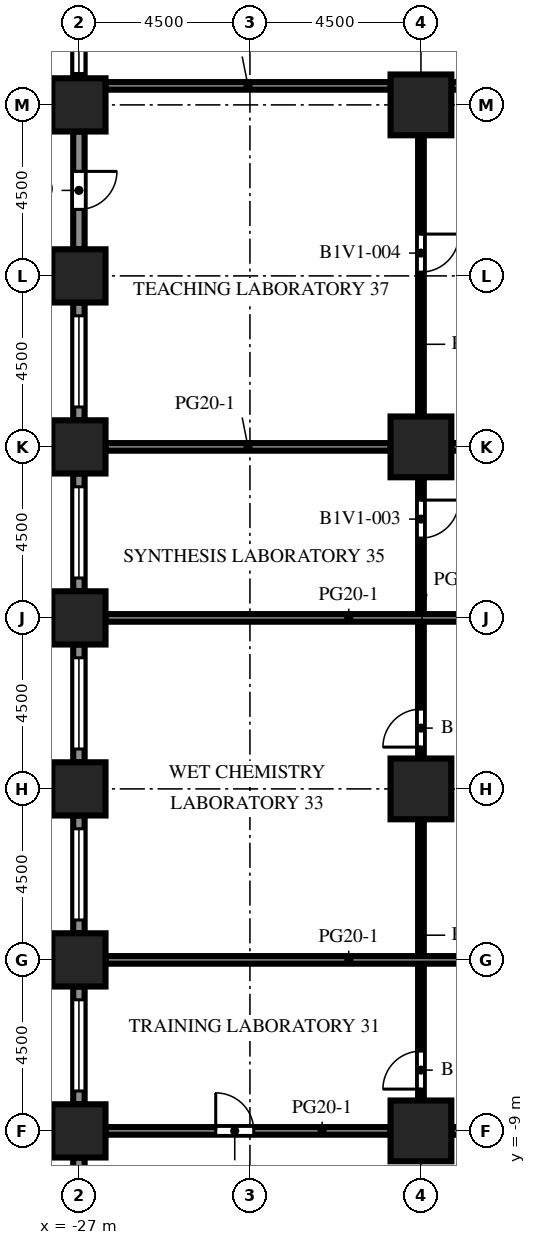
"""IFC4 building model, lengths in metres.
Left out: names, types, materials, properties, quantities, classifications, styles, units other than length and angle.
Written with IfcOpenShell. Run it as: python <this file> out.ifc"""

import sys

from ifc_helpers import new_model, si_unit, direction, frame, frame_2d, origin, origin_2d, place, context, subcontext, project, spatial, rectangle, extrude, element, fill, save


model = new_model("IFC4")
c1 = context("Model", 3, precision=1e-05, world=origin(), true_north=direction((0.0, 1.0)))
c2 = subcontext(c1, "Body", "Model", "MODEL_VIEW")
j1 = project(units=[si_unit("LENGTHUNIT", "METRE"), si_unit("PLANEANGLEUNIT", "RADIAN")], contexts=[c1])
p1 = place(None, origin())
s1 = spatial("IfcSite", under=j1, at=p1, CompositionType="ELEMENT")
p2 = place(p1, origin())
s2 = spatial("IfcBuilding", under=s1, at=p2, CompositionType="ELEMENT")
p3 = place(p2, frame((0.0, 0.0, 27.7)))
s3 = spatial("IfcBuildingStorey", under=s2, at=p3, CompositionType="ELEMENT", Elevation=27.7)
for number, where, z_axis, x_axis in (
    (1, (-27.0, -9.0, 0.0), (0.0, 0.0, 1.0), (1.0, 0.0, 0.0)),
    (2, (-27.0, -4.5, 0.0), (0.0, 0.0, 1.0), (1.0, 0.0, 0.0)),
    (3, (-27.0, 0.0, 0.0), (0.0, 0.0, 1.0), (1.0, 0.0, 0.0)),
    (4, (-27.0, 4.5, 0.0), (0.0, 0.0, 1.0), (1.0, 0.0, 0.0)),
    (5, (-27.0, 9.0, 0.0), (0.0, 0.0, 1.0), (1.0, 0.0, 0.0)),
    (6, (-27.0, 13.5, 0.0), (0.0, 0.0, 1.0), (1.0, 0.0, 0.0)),
    (7, (-27.0, 18.0, 0.0), (0.0, 0.0, 1.0), (1.0, 0.0, 0.0)),
):
    element("IfcColumn", number, at=place(p3, frame(where, z_axis=z_axis, x_axis=x_axis)), inside=s3, PredefinedType="COLUMN", context=c2, shape_type="SweptSolid", body=[
        extrude(rectangle(XDim=1.4, YDim=1.4, at=origin_2d()), origin(), (0.0, 0.0, 1.0), 4.1),
    ])
for number, where, z_axis, x_axis in (
    (8, (-18.0, -9.0, 0.0), (0.0, 0.0, 1.0), (1.0, 0.0, 0.0)),
    (9, (-18.0, 0.0, 0.0), (0.0, 0.0, 1.0), (1.0, 0.0, 0.0)),
    (10, (-18.0, 9.0, 0.0), (0.0, 0.0, 1.0), (1.0, 0.0, 0.0)),
    (11, (-18.0, 18.0, 0.0), (0.0, 0.0, 1.0), (1.0, 0.0, 0.0)),
):
    element("IfcColumn", number, at=place(p3, frame(where, z_axis=z_axis, x_axis=x_axis)), inside=s3, PredefinedType="COLUMN", context=c2, shape_type="SweptSolid", body=[
        extrude(rectangle(XDim=1.6, YDim=1.6, at=origin_2d()), origin(), (0.0, 0.0, 1.0), 4.1),
    ])
p4 = place(p3, frame((-27.0, 18.7, 0.0), z_axis=(0.0, 0.0, 1.0), x_axis=(0.0, 1.0, 0.0)))
e12 = element("IfcWall", 12, at=p4, inside=s3, PredefinedType="SOLIDWALL", context=c2, shape_type="SweptSolid", body=[
    extrude(rectangle(XDim=3.1, YDim=0.3, at=frame_2d((1.55, 0.0))), origin(), (0.0, 0.0, 1.0), 2.75),
])
p5 = place(p4, frame((0.125, 0.0, 0.8)))
e13 = element("IfcOpeningElement", 13, at=p5, cuts=e12, PredefinedType="OPENING", context=c2, shape_type="SweptSolid", body=[
    extrude(rectangle(XDim=2.4, YDim=1.7, at=frame_2d((1.2, 0.85))), frame((0.0, 0.16, 0.0), z_axis=(0.0, -1.0, 0.0), x_axis=(1.0, 0.0, 0.0)), (0.0, 0.0, 1.0), 0.32),
])
p6 = place(p3, frame((-27.0, 14.2, 0.0), z_axis=(0.0, 0.0, 1.0), x_axis=(0.0, 1.0, 0.0)))
e14 = element("IfcWall", 14, at=p6, inside=s3, PredefinedType="SOLIDWALL", context=c2, shape_type="SweptSolid", body=[
    extrude(rectangle(XDim=3.1, YDim=0.3, at=frame_2d((1.55, 0.0))), origin(), (0.0, 0.0, 1.0), 2.75),
])
p7 = place(p6, frame((1.05, 0.0, 0.0)))
e15 = element("IfcOpeningElement", 15, at=p7, cuts=e14, PredefinedType="OPENING", context=c2, shape_type="SweptSolid", body=[
    extrude(rectangle(XDim=1.0, YDim=2.2, at=frame_2d((0.5, 1.1))), frame((0.0, 0.16, 0.0), z_axis=(0.0, -1.0, 0.0), x_axis=(1.0, 0.0, 0.0)), (0.0, 0.0, 1.0), 0.32),
])
p8 = place(p3, frame((-27.0, 9.7, 0.0), z_axis=(0.0, 0.0, 1.0), x_axis=(0.0, 1.0, 0.0)))
e16 = element("IfcWall", 16, at=p8, inside=s3, PredefinedType="SOLIDWALL", context=c2, shape_type="SweptSolid", body=[
    extrude(rectangle(XDim=3.1, YDim=0.3, at=frame_2d((1.55, 0.0))), origin(), (0.0, 0.0, 1.0), 2.75),
])
p9 = place(p8, frame((0.35, 0.0, 0.8)))
e17 = element("IfcOpeningElement", 17, at=p9, cuts=e16, PredefinedType="OPENING", context=c2, shape_type="SweptSolid", body=[
    extrude(rectangle(XDim=2.4, YDim=1.7, at=frame_2d((1.2, 0.85))), frame((0.0, 0.16, 0.0), z_axis=(0.0, -1.0, 0.0), x_axis=(1.0, 0.0, 0.0)), (0.0, 0.0, 1.0), 0.32),
])
p10 = place(p3, frame((-27.0, 5.2, 0.0), z_axis=(0.0, 0.0, 1.0), x_axis=(0.0, 1.0, 0.0)))
e18 = element("IfcWall", 18, at=p10, inside=s3, PredefinedType="SOLIDWALL", context=c2, shape_type="SweptSolid", body=[
    extrude(rectangle(XDim=3.1, YDim=0.3, at=frame_2d((1.55, 0.0))), origin(), (0.0, 0.0, 1.0), 2.75),
])
p11 = place(p10, frame((0.35, 0.0, 0.8)))
e19 = element("IfcOpeningElement", 19, at=p11, cuts=e18, PredefinedType="OPENING", context=c2, shape_type="SweptSolid", body=[
    extrude(rectangle(XDim=2.4, YDim=1.7, at=frame_2d((1.2, 0.85))), frame((0.0, 0.16, 0.0), z_axis=(0.0, -1.0, 0.0), x_axis=(1.0, 0.0, 0.0)), (0.0, 0.0, 1.0), 0.32),
])
p12 = place(p3, frame((-27.0, 0.7, 0.0), z_axis=(0.0, 0.0, 1.0), x_axis=(0.0, 1.0, 0.0)))
e20 = element("IfcWall", 20, at=p12, inside=s3, PredefinedType="SOLIDWALL", context=c2, shape_type="SweptSolid", body=[
    extrude(rectangle(XDim=3.1, YDim=0.3, at=frame_2d((1.55, 0.0))), origin(), (0.0, 0.0, 1.0), 2.75),
])
p13 = place(p12, frame((0.35, 0.0, 0.8)))
e21 = element("IfcOpeningElement", 21, at=p13, cuts=e20, PredefinedType="OPENING", context=c2, shape_type="SweptSolid", body=[
    extrude(rectangle(XDim=2.4, YDim=1.7, at=frame_2d((1.2, 0.85))), frame((0.0, 0.16, 0.0), z_axis=(0.0, -1.0, 0.0), x_axis=(1.0, 0.0, 0.0)), (0.0, 0.0, 1.0), 0.32),
])
p14 = place(p3, frame((-27.0, -3.8, 0.0), z_axis=(0.0, 0.0, 1.0), x_axis=(0.0, 1.0, 0.0)))
e22 = element("IfcWall", 22, at=p14, inside=s3, PredefinedType="SOLIDWALL", context=c2, shape_type="SweptSolid", body=[
    extrude(rectangle(XDim=3.1, YDim=0.3, at=frame_2d((1.55, 0.0))), origin(), (0.0, 0.0, 1.0), 2.75),
])
p15 = place(p14, frame((0.35, 0.0, 0.8)))
e23 = element("IfcOpeningElement", 23, at=p15, cuts=e22, PredefinedType="OPENING", context=c2, shape_type="SweptSolid", body=[
    extrude(rectangle(XDim=2.4, YDim=1.7, at=frame_2d((1.2, 0.85))), frame((0.0, 0.16, 0.0), z_axis=(0.0, -1.0, 0.0), x_axis=(1.0, 0.0, 0.0)), (0.0, 0.0, 1.0), 0.32),
])
p16 = place(p3, frame((-27.0, -8.3, 0.0), z_axis=(0.0, 0.0, 1.0), x_axis=(0.0, 1.0, 0.0)))
e24 = element("IfcWall", 24, at=p16, inside=s3, PredefinedType="SOLIDWALL", context=c2, shape_type="SweptSolid", body=[
    extrude(rectangle(XDim=3.1, YDim=0.3, at=frame_2d((1.55, 0.0))), origin(), (0.0, 0.0, 1.0), 2.75),
])
p17 = place(p16, frame((0.35, 0.0, 0.8)))
e25 = element("IfcOpeningElement", 25, at=p17, cuts=e24, PredefinedType="OPENING", context=c2, shape_type="SweptSolid", body=[
    extrude(rectangle(XDim=2.4, YDim=1.7, at=frame_2d((1.2, 0.85))), frame((0.0, 0.16, 0.0), z_axis=(0.0, -1.0, 0.0), x_axis=(1.0, 0.0, 0.0)), (0.0, 0.0, 1.0), 0.32),
])
p18 = place(p3, frame((-27.0, -12.8, 0.0), z_axis=(0.0, 0.0, 1.0), x_axis=(0.0, 1.0, 0.0)))
e26 = element("IfcWall", 26, at=p18, inside=s3, PredefinedType="SOLIDWALL", context=c2, shape_type="SweptSolid", body=[
    extrude(rectangle(XDim=3.1, YDim=0.3, at=frame_2d((1.55, 0.0))), origin(), (0.0, 0.0, 1.0), 2.75),
])
p19 = place(p18, frame((1.425, 0.0, 0.8)))
e27 = element("IfcOpeningElement", 27, at=p19, cuts=e26, PredefinedType="OPENING", context=c2, shape_type="SweptSolid", body=[
    extrude(rectangle(XDim=1.2, YDim=1.7, at=frame_2d((0.6, 0.85))), frame((0.0, 0.16, 0.0), z_axis=(0.0, -1.0, 0.0), x_axis=(1.0, 0.0, 0.0)), (0.0, 0.0, 1.0), 0.32),
])
p20 = place(p3, frame((-18.0, -0.8, 0.0), z_axis=(0.0, 0.0, 1.0), x_axis=(0.0, -1.0, 0.0)))
e28 = element("IfcWall", 28, at=p20, inside=s3, PredefinedType="PARTITIONING", context=c2, shape_type="SweptSolid", body=[
    extrude(rectangle(XDim=7.4, YDim=0.15, at=frame_2d((3.7, 0.0))), origin(), (0.0, 0.0, 1.0), 3.65),
])
p21 = place(p20, frame((6.1, 0.0, 0.0)))
e29 = element("IfcOpeningElement", 29, at=p21, cuts=e28, PredefinedType="OPENING", context=c2, shape_type="SweptSolid", body=[
    extrude(rectangle(XDim=1.0, YDim=2.1, at=frame_2d((0.5, 1.05))), frame((0.0, 0.085, 0.0), z_axis=(0.0, -1.0, 0.0), x_axis=(1.0, 0.0, 0.0)), (0.0, 0.0, 1.0), 0.17),
])
p22 = place(p3, frame((-18.0, 0.8, 0.0), z_axis=(0.0, 0.0, 1.0), x_axis=(0.0, 1.0, 0.0)))
e30 = element("IfcWall", 30, at=p22, inside=s3, PredefinedType="PARTITIONING", context=c2, shape_type="SweptSolid", body=[
    extrude(rectangle(XDim=7.4, YDim=0.15, at=frame_2d((3.7, 0.0))), origin(), (0.0, 0.0, 1.0), 3.65),
])
p23 = place(p22, frame((0.3, 0.0, 0.0)))
e31 = element("IfcOpeningElement", 31, at=p23, cuts=e30, PredefinedType="OPENING", context=c2, shape_type="SweptSolid", body=[
    extrude(rectangle(XDim=1.0, YDim=2.1, at=frame_2d((0.5, 1.05))), frame((0.0, 0.085, 0.0), z_axis=(0.0, -1.0, 0.0), x_axis=(1.0, 0.0, 0.0)), (0.0, 0.0, 1.0), 0.17),
])
p24 = place(p22, frame((5.8, 0.0, 0.0)))
e32 = element("IfcOpeningElement", 32, at=p24, cuts=e30, PredefinedType="OPENING", context=c2, shape_type="SweptSolid", body=[
    extrude(rectangle(XDim=1.0, YDim=2.1, at=frame_2d((0.5, 1.05))), frame((0.0, 0.085, 0.0), z_axis=(0.0, -1.0, 0.0), x_axis=(1.0, 0.0, 0.0)), (0.0, 0.0, 1.0), 0.17),
])
p25 = place(p3, frame((-18.0, 9.8, 0.0), z_axis=(0.0, 0.0, 1.0), x_axis=(0.0, 1.0, 0.0)))
e33 = element("IfcWall", 33, at=p25, inside=s3, PredefinedType="PARTITIONING", context=c2, shape_type="SweptSolid", body=[
    extrude(rectangle(XDim=7.4, YDim=0.15, at=frame_2d((3.7, 0.0))), origin(), (0.0, 0.0, 1.0), 3.65),
])
p26 = place(p25, frame((3.8, 0.0, 0.0)))
e34 = element("IfcOpeningElement", 34, at=p26, cuts=e33, PredefinedType="OPENING", context=c2, shape_type="SweptSolid", body=[
    extrude(rectangle(XDim=1.0, YDim=2.1, at=frame_2d((0.5, 1.05))), frame((0.0, 0.085, 0.0), z_axis=(0.0, -1.0, 0.0), x_axis=(1.0, 0.0, 0.0)), (0.0, 0.0, 1.0), 0.17),
])
p27 = place(p3, frame((-26.3, -9.0, 0.0), z_axis=(0.0, 0.0, 1.0), x_axis=(1.0, 0.0, 0.0)))
e35 = element("IfcWall", 35, at=p27, inside=s3, PredefinedType="PARTITIONING", context=c2, shape_type="SweptSolid", body=[
    extrude(rectangle(XDim=7.5, YDim=0.2, at=frame_2d((3.75, 0.0))), origin(), (0.0, 0.0, 1.0), 3.65),
])
p28 = place(p27, frame((2.9, 0.0, 0.0)))
e36 = element("IfcOpeningElement", 36, at=p28, cuts=e35, PredefinedType="OPENING", context=c2, shape_type="SweptSolid", body=[
    extrude(rectangle(XDim=1.0, YDim=2.1, at=frame_2d((0.5, 1.05))), frame((0.0, 0.11, 0.0), z_axis=(0.0, -1.0, 0.0), x_axis=(1.0, 0.0, 0.0)), (0.0, 0.0, 1.0), 0.22),
])
p29 = place(p3, frame((-17.2, -9.0, 0.0), z_axis=(0.0, 0.0, 1.0), x_axis=(1.0, 0.0, 0.0)))
e37 = element("IfcWall", 37, at=p29, inside=s3, PredefinedType="PARTITIONING", context=c2, shape_type="SweptSolid", body=[
    extrude(rectangle(XDim=3.7, YDim=0.2, at=frame_2d((1.85, 0.0))), origin(), (0.0, 0.0, 1.0), 3.65),
])
for number, where, z_axis, x_axis in (
    (38, (-26.3, -4.5, 0.0), (0.0, 0.0, 1.0), (1.0, 0.0, 0.0)),
    (39, (-26.3, 4.5, 0.0), (0.0, 0.0, 1.0), (1.0, 0.0, 0.0)),
):
    element("IfcWall", number, at=place(p3, frame(where, z_axis=z_axis, x_axis=x_axis)), inside=s3, PredefinedType="PARTITIONING", context=c2, shape_type="SweptSolid", body=[
        extrude(rectangle(XDim=12.8, YDim=0.2, at=frame_2d((6.4, 0.0))), origin(), (0.0, 0.0, 1.0), 3.65),
    ])
p30 = place(p3, frame((-26.3, 9.0, 0.0), z_axis=(0.0, 0.0, 1.0), x_axis=(1.0, 0.0, 0.0)))
e40 = element("IfcWall", 40, at=p30, inside=s3, PredefinedType="PARTITIONING", context=c2, shape_type="SweptSolid", body=[
    extrude(rectangle(XDim=7.5, YDim=0.2, at=frame_2d((3.75, 0.0))), origin(), (0.0, 0.0, 1.0), 3.65),
])
p31 = place(p3, frame((-17.2, 9.0, 0.0), z_axis=(0.0, 0.0, 1.0), x_axis=(1.0, 0.0, 0.0)))
e41 = element("IfcWall", 41, at=p31, inside=s3, PredefinedType="PARTITIONING", context=c2, shape_type="SweptSolid", body=[
    extrude(rectangle(XDim=3.7, YDim=0.2, at=frame_2d((1.85, 0.0))), origin(), (0.0, 0.0, 1.0), 3.65),
])
p32 = place(p3, frame((-26.3, 18.5, 0.0), z_axis=(0.0, 0.0, 1.0), x_axis=(1.0, 0.0, 0.0)))
e42 = element("IfcWall", 42, at=p32, inside=s3, PredefinedType="PARTITIONING", context=c2, shape_type="SweptSolid", body=[
    extrude(rectangle(XDim=7.5, YDim=0.2, at=frame_2d((3.75, 0.0))), origin(), (0.0, 0.0, 1.0), 3.65),
])
p33 = place(p3, frame((-17.2, 18.5, 0.0), z_axis=(0.0, 0.0, 1.0), x_axis=(1.0, 0.0, 0.0)))
e43 = element("IfcWall", 43, at=p33, inside=s3, PredefinedType="PARTITIONING", context=c2, shape_type="SweptSolid", body=[
    extrude(rectangle(XDim=3.7, YDim=0.2, at=frame_2d((1.85, 0.0))), origin(), (0.0, 0.0, 1.0), 3.65),
])
p34 = place(p5, origin())
e44 = element("IfcWindow", 44, at=p34, inside=s3, PartitioningType="SINGLE_PANEL", PredefinedType="WINDOW", context=c2, shape_type="SweptSolid", body=[
    extrude(rectangle(XDim=2.4, YDim=1.7, at=frame_2d((1.2, 0.85))), frame((0.0, 0.03, 0.0), z_axis=(0.0, -1.0, 0.0), x_axis=(1.0, 0.0, 0.0)), (0.0, 0.0, 1.0), 0.06),
])
fill(e13, e44)
p35 = place(p7, origin())
e45 = element("IfcDoor", 45, at=p35, inside=s3, OperationType="SINGLE_SWING_RIGHT", PredefinedType="DOOR", context=c2, shape_type="SweptSolid", body=[
    extrude(rectangle(XDim=1.0, YDim=2.2, at=frame_2d((0.5, 1.1))), frame((0.0, 0.025, 0.0), z_axis=(0.0, -1.0, 0.0), x_axis=(1.0, 0.0, 0.0)), (0.0, 0.0, 1.0), 0.05),
])
fill(e15, e45)
p36 = place(p9, origin())
e46 = element("IfcWindow", 46, at=p36, inside=s3, PartitioningType="SINGLE_PANEL", PredefinedType="WINDOW", context=c2, shape_type="SweptSolid", body=[
    extrude(rectangle(XDim=2.4, YDim=1.7, at=frame_2d((1.2, 0.85))), frame((0.0, 0.03, 0.0), z_axis=(0.0, -1.0, 0.0), x_axis=(1.0, 0.0, 0.0)), (0.0, 0.0, 1.0), 0.06),
])
fill(e17, e46)
p37 = place(p11, origin())
e47 = element("IfcWindow", 47, at=p37, inside=s3, PartitioningType="SINGLE_PANEL", PredefinedType="WINDOW", context=c2, shape_type="SweptSolid", body=[
    extrude(rectangle(XDim=2.4, YDim=1.7, at=frame_2d((1.2, 0.85))), frame((0.0, 0.03, 0.0), z_axis=(0.0, -1.0, 0.0), x_axis=(1.0, 0.0, 0.0)), (0.0, 0.0, 1.0), 0.06),
])
fill(e19, e47)
p38 = place(p13, origin())
e48 = element("IfcWindow", 48, at=p38, inside=s3, PartitioningType="SINGLE_PANEL", PredefinedType="WINDOW", context=c2, shape_type="SweptSolid", body=[
    extrude(rectangle(XDim=2.4, YDim=1.7, at=frame_2d((1.2, 0.85))), frame((0.0, 0.03, 0.0), z_axis=(0.0, -1.0, 0.0), x_axis=(1.0, 0.0, 0.0)), (0.0, 0.0, 1.0), 0.06),
])
fill(e21, e48)
p39 = place(p15, origin())
e49 = element("IfcWindow", 49, at=p39, inside=s3, PartitioningType="SINGLE_PANEL", PredefinedType="WINDOW", context=c2, shape_type="SweptSolid", body=[
    extrude(rectangle(XDim=2.4, YDim=1.7, at=frame_2d((1.2, 0.85))), frame((0.0, 0.03, 0.0), z_axis=(0.0, -1.0, 0.0), x_axis=(1.0, 0.0, 0.0)), (0.0, 0.0, 1.0), 0.06),
])
fill(e23, e49)
p40 = place(p17, origin())
e50 = element("IfcWindow", 50, at=p40, inside=s3, PartitioningType="SINGLE_PANEL", PredefinedType="WINDOW", context=c2, shape_type="SweptSolid", body=[
    extrude(rectangle(XDim=2.4, YDim=1.7, at=frame_2d((1.2, 0.85))), frame((0.0, 0.03, 0.0), z_axis=(0.0, -1.0, 0.0), x_axis=(1.0, 0.0, 0.0)), (0.0, 0.0, 1.0), 0.06),
])
fill(e25, e50)
p41 = place(p21, origin())
e51 = element("IfcDoor", 51, at=p41, inside=s3, OperationType="SINGLE_SWING_RIGHT", PredefinedType="DOOR", context=c2, shape_type="SweptSolid", body=[
    extrude(rectangle(XDim=1.0, YDim=2.1, at=frame_2d((0.5, 1.05))), frame((0.0, 0.025, 0.0), z_axis=(0.0, -1.0, 0.0), x_axis=(1.0, 0.0, 0.0)), (0.0, 0.0, 1.0), 0.05),
])
fill(e29, e51)
p42 = place(p23, origin())
e52 = element("IfcDoor", 52, at=p42, inside=s3, OperationType="SINGLE_SWING_LEFT", PredefinedType="DOOR", context=c2, shape_type="SweptSolid", body=[
    extrude(rectangle(XDim=1.0, YDim=2.1, at=frame_2d((0.5, 1.05))), frame((0.0, 0.025, 0.0), z_axis=(0.0, -1.0, 0.0), x_axis=(1.0, 0.0, 0.0)), (0.0, 0.0, 1.0), 0.05),
])
fill(e31, e52)
p43 = place(p24, origin())
e53 = element("IfcDoor", 53, at=p43, inside=s3, OperationType="SINGLE_SWING_RIGHT", PredefinedType="DOOR", context=c2, shape_type="SweptSolid", body=[
    extrude(rectangle(XDim=1.0, YDim=2.1, at=frame_2d((0.5, 1.05))), frame((0.0, 0.025, 0.0), z_axis=(0.0, -1.0, 0.0), x_axis=(1.0, 0.0, 0.0)), (0.0, 0.0, 1.0), 0.05),
])
fill(e32, e53)
p44 = place(p26, origin())
e54 = element("IfcDoor", 54, at=p44, inside=s3, OperationType="SINGLE_SWING_RIGHT", PredefinedType="DOOR", context=c2, shape_type="SweptSolid", body=[
    extrude(rectangle(XDim=1.0, YDim=2.1, at=frame_2d((0.5, 1.05))), frame((0.0, 0.025, 0.0), z_axis=(0.0, -1.0, 0.0), x_axis=(1.0, 0.0, 0.0)), (0.0, 0.0, 1.0), 0.05),
])
fill(e34, e54)
p45 = place(p28, origin())
e55 = element("IfcDoor", 55, at=p45, inside=s3, OperationType="SINGLE_SWING_LEFT", PredefinedType="DOOR", context=c2, shape_type="SweptSolid", body=[
    extrude(rectangle(XDim=1.0, YDim=2.1, at=frame_2d((0.5, 1.05))), frame((0.0, 0.025, 0.0), z_axis=(0.0, -1.0, 0.0), x_axis=(1.0, 0.0, 0.0)), (0.0, 0.0, 1.0), 0.05),
])
fill(e36, e55)
save(model, sys.argv[1])
